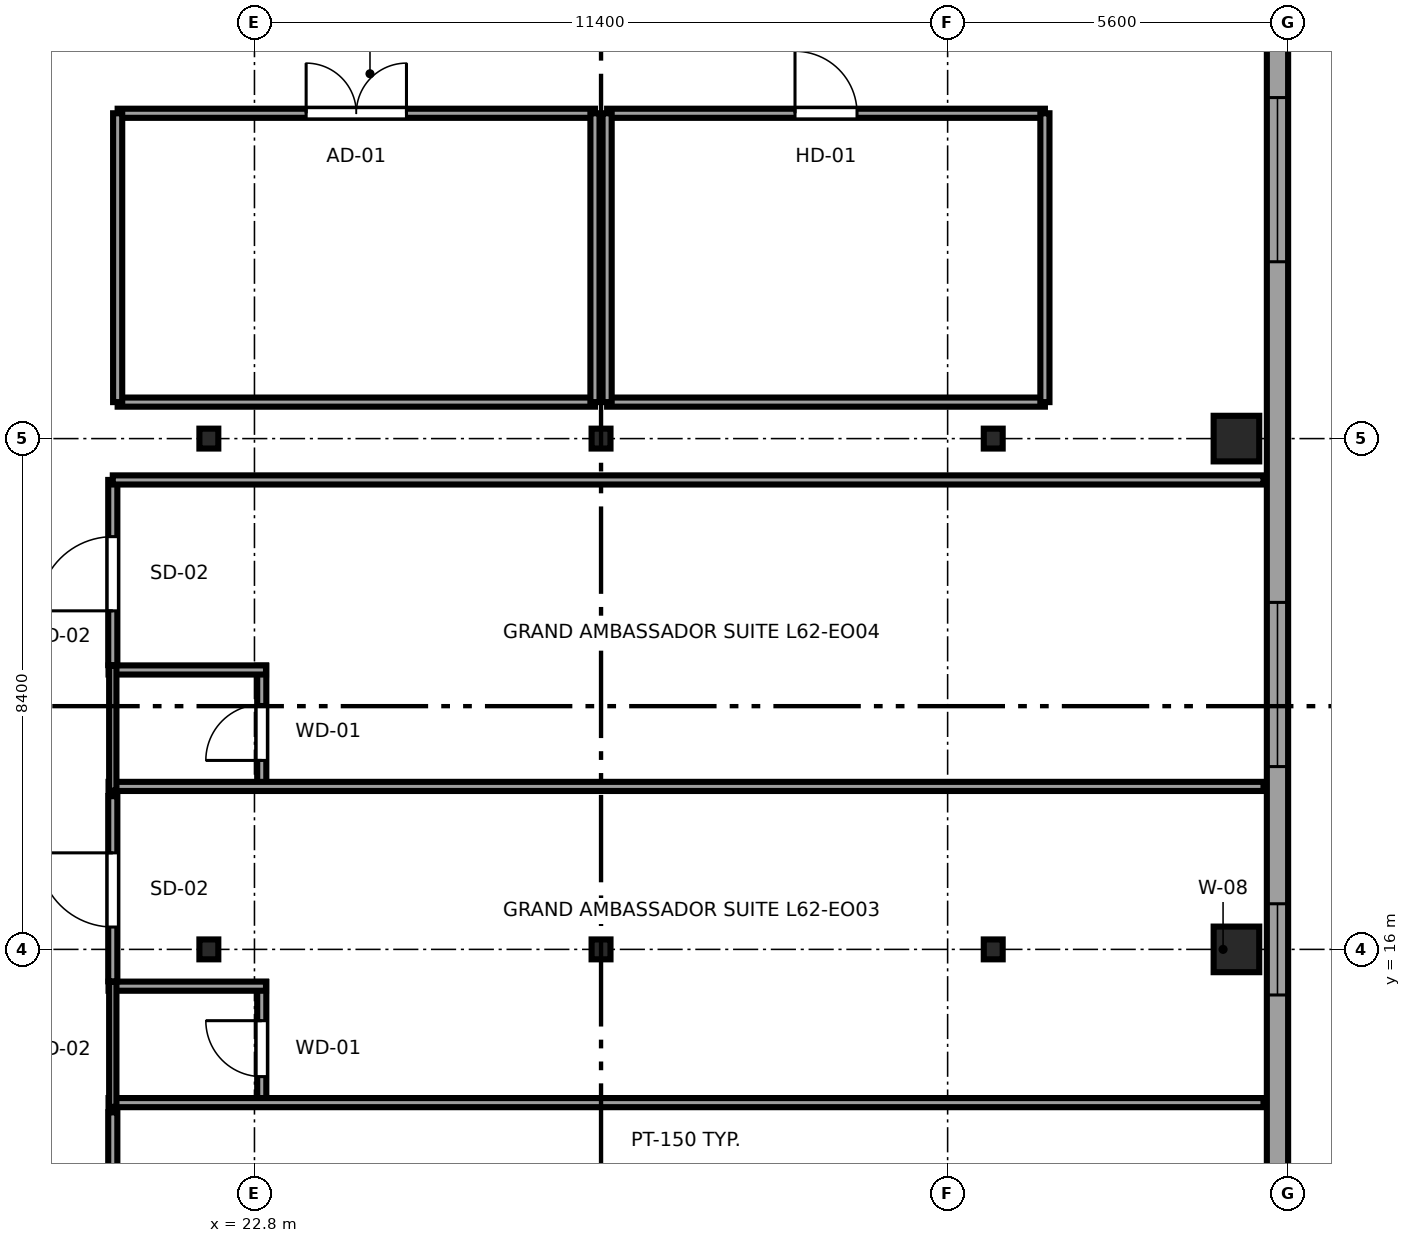
"""IFC4 building model, lengths in metres.
Left out: names, types, materials, properties, quantities, classifications, styles, units other than length and angle.
Written with IfcOpenShell. Run it as: python <this file> out.ifc"""

import sys

from ifc_helpers import new_model, si_unit, direction, frame, frame_2d, origin, origin_2d, place, context, subcontext, project, spatial, rectangle, i_section, extrude, source, transform, mapped, element, fill, save


model = new_model("IFC4")
c1 = context("Model", 3, precision=1e-05, world=origin(), true_north=direction((0.0, 1.0)))
c2 = subcontext(c1, "Body", "Model", "MODEL_VIEW")
j1 = project(units=[si_unit("LENGTHUNIT", "METRE"), si_unit("PLANEANGLEUNIT", "RADIAN")], contexts=[c1])
p1 = place(None, origin())
s1 = spatial("IfcSite", under=j1, at=p1, CompositionType="ELEMENT")
p2 = place(p1, origin())
s2 = spatial("IfcBuilding", under=s1, at=p2, CompositionType="ELEMENT")
p3 = place(p2, frame((0.0, 0.0, 234.55)))
s3 = spatial("IfcBuildingStorey", under=s2, at=p3, CompositionType="ELEMENT", Elevation=234.55)
m1 = source(origin(), c2, "Body", "SweptSolid", [
    extrude(i_section(OverallWidth=0.311, OverallDepth=0.327, WebThickness=0.016, FlangeThickness=0.025, FilletRadius=0.017, at=origin_2d()), origin(), (0.0, 0.0, 1.0), 3.55),
])
for number, where, z_axis, x_axis in (
    (1, (22.05, 16.0, 0.0), (0.0, 0.0, 1.0), (1.0, 0.0, 0.0)),
    (2, (22.05, 24.4, 0.0), (0.0, 0.0, 1.0), (1.0, 0.0, 0.0)),
    (3, (28.5, 16.0, 0.0), (0.0, 0.0, 1.0), (1.0, 0.0, 0.0)),
    (4, (28.5, 24.4, 0.0), (0.0, 0.0, 1.0), (1.0, 0.0, 0.0)),
    (5, (34.95, 16.0, 0.0), (0.0, 0.0, 1.0), (1.0, 0.0, 0.0)),
    (6, (34.95, 24.4, 0.0), (0.0, 0.0, 1.0), (1.0, 0.0, 0.0)),
):
    element("IfcColumn", number, at=place(p3, frame(where, z_axis=z_axis, x_axis=x_axis)), inside=s3, PredefinedType="COLUMN", context=c2, shape_type="MappedRepresentation", body=[
        mapped(m1, transform((0.0, 0.0, 0.0), x_axis=(1.0, 0.0, 0.0), y_axis=(0.0, 1.0, 0.0), z_axis=(0.0, 0.0, 1.0), scale=1.0)),
    ])
m2 = source(origin(), c2, "Body", "SweptSolid", [
    extrude(rectangle(XDim=0.75, YDim=0.75, at=origin_2d()), origin(), (0.0, 0.0, 1.0), 3.55),
])
for number, where, z_axis, x_axis in (
    (7, (38.95, 16.0, 0.0), (0.0, 0.0, 1.0), (1.0, 0.0, 0.0)),
    (8, (38.95, 24.4, 0.0), (0.0, 0.0, 1.0), (1.0, 0.0, 0.0)),
):
    element("IfcColumn", number, at=place(p3, frame(where, z_axis=z_axis, x_axis=x_axis)), inside=s3, PredefinedType="COLUMN", context=c2, shape_type="MappedRepresentation", body=[
        mapped(m2, transform((0.0, 0.0, 0.0), x_axis=(1.0, 0.0, 0.0), y_axis=(0.0, 1.0, 0.0), z_axis=(0.0, 0.0, 1.0), scale=1.0)),
    ])
p4 = place(p3, frame((39.625, 7.017, 0.0), z_axis=(0.0, 0.0, 1.0), x_axis=(0.0, 1.0, 0.0)))
e9 = element("IfcWall", 9, at=p4, inside=s3, PredefinedType="SOLIDWALL", context=c2, shape_type="SweptSolid", body=[
    extrude(rectangle(XDim=24.579, YDim=0.35, at=frame_2d((12.29, 0.0))), origin(), (0.0, 0.0, 1.0), 3.37),
])
p5 = place(p4, frame((2.138, 0.0, 0.68)))
e10 = element("IfcOpeningElement", 10, at=p5, cuts=e9, PredefinedType="OPENING", context=c2, shape_type="SweptSolid", body=[
    extrude(rectangle(XDim=2.7, YDim=1.95, at=frame_2d((1.35, 0.975))), frame((0.0, 0.185, 0.0), z_axis=(0.0, -1.0, 0.0), x_axis=(1.0, 0.0, 0.0)), (0.0, 0.0, 1.0), 0.37),
])
p6 = place(p4, frame((11.989, 0.0, 0.68)))
e11 = element("IfcOpeningElement", 11, at=p6, cuts=e9, PredefinedType="OPENING", context=c2, shape_type="SweptSolid", body=[
    extrude(rectangle(XDim=2.7, YDim=1.95, at=frame_2d((1.35, 0.975))), frame((0.0, 0.185, 0.0), z_axis=(0.0, -1.0, 0.0), x_axis=(1.0, 0.0, 0.0)), (0.0, 0.0, 1.0), 0.37),
])
p7 = place(p4, frame((20.291, 0.0, 0.68)))
e12 = element("IfcOpeningElement", 12, at=p7, cuts=e9, PredefinedType="OPENING", context=c2, shape_type="SweptSolid", body=[
    extrude(rectangle(XDim=2.7, YDim=1.95, at=frame_2d((1.35, 0.975))), frame((0.0, 0.185, 0.0), z_axis=(0.0, -1.0, 0.0), x_axis=(1.0, 0.0, 0.0)), (0.0, 0.0, 1.0), 0.37),
])
p8 = place(p4, frame((8.233, 0.0, 0.62)))
e13 = element("IfcOpeningElement", 13, at=p8, cuts=e9, PredefinedType="OPENING", context=c2, shape_type="SweptSolid", body=[
    extrude(rectangle(XDim=1.5, YDim=1.55, at=frame_2d((0.75, 0.775))), frame((0.0, 0.185, 0.0), z_axis=(0.0, -1.0, 0.0), x_axis=(1.0, 0.0, 0.0)), (0.0, 0.0, 1.0), 0.37),
])
p9 = place(p3, frame((22.92, 13.41, 0.0), z_axis=(0.0, 0.0, 1.0), x_axis=(0.0, 1.0, 0.0)))
e14 = element("IfcWall", 14, at=p9, inside=s3, PredefinedType="PARTITIONING", context=c2, shape_type="SweptSolid", body=[
    extrude(rectangle(XDim=2.055, YDim=0.15, at=frame_2d((1.028, 0.0))), origin(), (0.0, 0.0, 1.0), 3.37),
])
p10 = place(p9, frame((0.498, 0.0, 0.0)))
e15 = element("IfcOpeningElement", 15, at=p10, cuts=e14, PredefinedType="OPENING", context=c2, shape_type="SweptSolid", body=[
    extrude(rectangle(XDim=0.92, YDim=2.01, at=frame_2d((0.46, 1.005))), frame((0.0, 0.085, 0.0), z_axis=(0.0, -1.0, 0.0), x_axis=(1.0, 0.0, 0.0)), (0.0, 0.0, 1.0), 0.17),
])
p11 = place(p3, frame((20.4, 13.48, 0.0), z_axis=(0.0, 0.0, 1.0), x_axis=(1.0, 0.0, 0.0)))
e16 = element("IfcWall", 16, at=p11, inside=s3, PredefinedType="PARTITIONING", context=c2, shape_type="SweptSolid", body=[
    extrude(rectangle(XDim=18.995, YDim=0.15, at=frame_2d((9.498, 0.0))), origin(), (0.0, 0.0, 1.0), 3.37),
])
p12 = place(p3, frame((20.4, 15.395, 0.0), z_axis=(0.0, 0.0, 1.0), x_axis=(1.0, 0.0, 0.0)))
e17 = element("IfcWall", 17, at=p12, inside=s3, PredefinedType="PARTITIONING", context=c2, shape_type="SweptSolid", body=[
    extrude(rectangle(XDim=2.59, YDim=0.15, at=frame_2d((1.295, 0.0))), origin(), (0.0, 0.0, 1.0), 3.37),
])
p13 = place(p3, frame((20.47, 13.41, 0.0), z_axis=(0.0, 0.0, 1.0), x_axis=(0.0, 1.0, 0.0)))
e18 = element("IfcWall", 18, at=p13, inside=s3, PredefinedType="PLUMBINGWALL", context=c2, shape_type="SweptSolid", body=[
    extrude(rectangle(XDim=2.055, YDim=0.12, at=frame_2d((1.028, 0.0))), origin(), (0.0, 0.0, 1.0), 3.37),
])
p14 = place(p3, frame((22.92, 18.61, 0.0), z_axis=(0.0, 0.0, 1.0), x_axis=(0.0, 1.0, 0.0)))
e19 = element("IfcWall", 19, at=p14, inside=s3, PredefinedType="PARTITIONING", context=c2, shape_type="SweptSolid", body=[
    extrude(rectangle(XDim=2.055, YDim=0.15, at=frame_2d((1.027, 0.0))), origin(), (0.0, 0.0, 1.0), 3.37),
])
p15 = place(p14, frame((0.498, 0.0, 0.0)))
e20 = element("IfcOpeningElement", 20, at=p15, cuts=e19, PredefinedType="OPENING", context=c2, shape_type="SweptSolid", body=[
    extrude(rectangle(XDim=0.92, YDim=2.01, at=frame_2d((0.46, 1.005))), frame((0.0, 0.085, 0.0), z_axis=(0.0, -1.0, 0.0), x_axis=(1.0, 0.0, 0.0)), (0.0, 0.0, 1.0), 0.17),
])
p16 = place(p3, frame((20.4, 18.68, 0.0), z_axis=(0.0, 0.0, 1.0), x_axis=(1.0, 0.0, 0.0)))
e21 = element("IfcWall", 21, at=p16, inside=s3, PredefinedType="PARTITIONING", context=c2, shape_type="SweptSolid", body=[
    extrude(rectangle(XDim=18.995, YDim=0.15, at=frame_2d((9.498, 0.0))), origin(), (0.0, 0.0, 1.0), 3.37),
])
p17 = place(p3, frame((20.4, 20.595, 0.0), z_axis=(0.0, 0.0, 1.0), x_axis=(1.0, 0.0, 0.0)))
e22 = element("IfcWall", 22, at=p17, inside=s3, PredefinedType="PARTITIONING", context=c2, shape_type="SweptSolid", body=[
    extrude(rectangle(XDim=2.59, YDim=0.15, at=frame_2d((1.295, 0.0))), origin(), (0.0, 0.0, 1.0), 3.37),
])
p18 = place(p3, frame((20.47, 18.61, 0.0), z_axis=(0.0, 0.0, 1.0), x_axis=(0.0, 1.0, 0.0)))
e23 = element("IfcWall", 23, at=p18, inside=s3, PredefinedType="PLUMBINGWALL", context=c2, shape_type="SweptSolid", body=[
    extrude(rectangle(XDim=2.055, YDim=0.12, at=frame_2d((1.027, 0.0))), origin(), (0.0, 0.0, 1.0), 3.37),
])
p19 = place(p3, frame((20.47, 10.275, 0.0), z_axis=(0.0, 0.0, 1.0), x_axis=(0.0, 1.0, 0.0)))
e24 = element("IfcWall", 24, at=p19, inside=s3, PredefinedType="PARTITIONING", context=c2, shape_type="SweptSolid", body=[
    extrude(rectangle(XDim=3.045, YDim=0.15, at=frame_2d((1.522, 0.0))), origin(), (0.0, 0.0, 1.0), 3.37),
])
p20 = place(p19, frame((0.893, 0.0, 0.0)))
e25 = element("IfcOpeningElement", 25, at=p20, cuts=e24, PredefinedType="OPENING", context=c2, shape_type="SweptSolid", body=[
    extrude(rectangle(XDim=1.22, YDim=2.08, at=frame_2d((0.61, 1.04))), frame((0.0, 0.085, 0.0), z_axis=(0.0, -1.0, 0.0), x_axis=(1.0, 0.0, 0.0)), (0.0, 0.0, 1.0), 0.17),
])
p21 = place(p3, frame((20.47, 15.475, 0.0), z_axis=(0.0, 0.0, 1.0), x_axis=(0.0, 1.0, 0.0)))
e26 = element("IfcWall", 26, at=p21, inside=s3, PredefinedType="PARTITIONING", context=c2, shape_type="SweptSolid", body=[
    extrude(rectangle(XDim=3.045, YDim=0.15, at=frame_2d((1.522, 0.0))), origin(), (0.0, 0.0, 1.0), 3.37),
])
p22 = place(p21, frame((0.893, 0.0, 0.0)))
e27 = element("IfcOpeningElement", 27, at=p22, cuts=e26, PredefinedType="OPENING", context=c2, shape_type="SweptSolid", body=[
    extrude(rectangle(XDim=1.22, YDim=2.08, at=frame_2d((0.61, 1.04))), frame((0.0, 0.085, 0.0), z_axis=(0.0, -1.0, 0.0), x_axis=(1.0, 0.0, 0.0)), (0.0, 0.0, 1.0), 0.17),
])
p23 = place(p3, frame((20.47, 20.675, 0.0), z_axis=(0.0, 0.0, 1.0), x_axis=(0.0, 1.0, 0.0)))
e28 = element("IfcWall", 28, at=p23, inside=s3, PredefinedType="PARTITIONING", context=c2, shape_type="SweptSolid", body=[
    extrude(rectangle(XDim=3.045, YDim=0.15, at=frame_2d((1.522, 0.0))), origin(), (0.0, 0.0, 1.0), 3.37),
])
p24 = place(p23, frame((0.893, 0.0, 0.0)))
e29 = element("IfcOpeningElement", 29, at=p24, cuts=e28, PredefinedType="OPENING", context=c2, shape_type="SweptSolid", body=[
    extrude(rectangle(XDim=1.22, YDim=2.08, at=frame_2d((0.61, 1.04))), frame((0.0, 0.085, 0.0), z_axis=(0.0, -1.0, 0.0), x_axis=(1.0, 0.0, 0.0)), (0.0, 0.0, 1.0), 0.17),
])
p25 = place(p3, frame((20.47, 23.72, 0.0), z_axis=(0.0, 0.0, 1.0), x_axis=(1.0, 0.0, 0.0)))
e30 = element("IfcWall", 30, at=p25, inside=s3, PredefinedType="PARTITIONING", context=c2, shape_type="SweptSolid", body=[
    extrude(rectangle(XDim=18.925, YDim=0.15, at=frame_2d((9.462, 0.0))), origin(), (0.0, 0.0, 1.0), 3.37),
])
p26 = place(p3, frame((20.55, 25.0, 0.0), z_axis=(0.0, 0.0, 1.0), x_axis=(1.0, 0.0, 0.0)))
e31 = element("IfcWall", 31, at=p26, inside=s3, PredefinedType="PARTITIONING", context=c2, shape_type="SweptSolid", body=[
    extrude(rectangle(XDim=7.85, YDim=0.15, at=frame_2d((3.925, 0.0))), origin(), (0.0, 0.0, 1.0), 3.37),
])
p27 = place(p3, frame((20.55, 29.75, 0.0), z_axis=(0.0, 0.0, 1.0), x_axis=(1.0, 0.0, 0.0)))
e32 = element("IfcWall", 32, at=p27, inside=s3, PredefinedType="PARTITIONING", context=c2, shape_type="SweptSolid", body=[
    extrude(rectangle(XDim=7.85, YDim=0.15, at=frame_2d((3.925, 0.0))), origin(), (0.0, 0.0, 1.0), 3.37),
])
p28 = place(p27, frame((3.1, 0.0, 0.0)))
e33 = element("IfcOpeningElement", 33, at=p28, cuts=e32, PredefinedType="OPENING", context=c2, shape_type="SweptSolid", body=[
    extrude(rectangle(XDim=1.65, YDim=2.15, at=frame_2d((0.825, 1.075))), frame((0.0, 0.085, 0.0), z_axis=(0.0, -1.0, 0.0), x_axis=(1.0, 0.0, 0.0)), (0.0, 0.0, 1.0), 0.17),
])
p29 = place(p3, frame((20.55, 25.0, 0.0), z_axis=(0.0, 0.0, 1.0), x_axis=(0.0, 1.0, 0.0)))
e34 = element("IfcWall", 34, at=p29, inside=s3, PredefinedType="PARTITIONING", context=c2, shape_type="SweptSolid", body=[
    extrude(rectangle(XDim=4.75, YDim=0.15, at=frame_2d((2.375, 0.0))), origin(), (0.0, 0.0, 1.0), 3.37),
])
p30 = place(p3, frame((28.4, 25.0, 0.0), z_axis=(0.0, 0.0, 1.0), x_axis=(0.0, 1.0, 0.0)))
e35 = element("IfcWall", 35, at=p30, inside=s3, PredefinedType="PARTITIONING", context=c2, shape_type="SweptSolid", body=[
    extrude(rectangle(XDim=4.75, YDim=0.15, at=frame_2d((2.375, 0.0))), origin(), (0.0, 0.0, 1.0), 2.758),
])
p31 = place(p3, frame((28.6, 25.0, 0.0), z_axis=(0.0, 0.0, 1.0), x_axis=(1.0, 0.0, 0.0)))
e36 = element("IfcWall", 36, at=p31, inside=s3, PredefinedType="PARTITIONING", context=c2, shape_type="SweptSolid", body=[
    extrude(rectangle(XDim=7.2, YDim=0.15, at=frame_2d((3.6, 0.0))), origin(), (0.0, 0.0, 1.0), 3.37),
])
p32 = place(p3, frame((28.6, 29.75, 0.0), z_axis=(0.0, 0.0, 1.0), x_axis=(1.0, 0.0, 0.0)))
e37 = element("IfcWall", 37, at=p32, inside=s3, PredefinedType="PARTITIONING", context=c2, shape_type="SweptSolid", body=[
    extrude(rectangle(XDim=7.2, YDim=0.15, at=frame_2d((3.6, 0.0))), origin(), (0.0, 0.0, 1.0), 3.37),
])
p33 = place(p32, frame((3.09, 0.0, 0.0)))
e38 = element("IfcOpeningElement", 38, at=p33, cuts=e37, PredefinedType="OPENING", context=c2, shape_type="SweptSolid", body=[
    extrude(rectangle(XDim=1.02, YDim=2.03, at=frame_2d((0.51, 1.015))), frame((0.0, 0.085, 0.0), z_axis=(0.0, -1.0, 0.0), x_axis=(1.0, 0.0, 0.0)), (0.0, 0.0, 1.0), 0.17),
])
p34 = place(p3, frame((28.6, 25.0, 0.0), z_axis=(0.0, 0.0, 1.0), x_axis=(0.0, 1.0, 0.0)))
e39 = element("IfcWall", 39, at=p34, inside=s3, PredefinedType="PARTITIONING", context=c2, shape_type="SweptSolid", body=[
    extrude(rectangle(XDim=4.75, YDim=0.15, at=frame_2d((2.375, 0.0))), origin(), (0.0, 0.0, 1.0), 2.758),
])
p35 = place(p3, frame((35.8, 25.0, 0.0), z_axis=(0.0, 0.0, 1.0), x_axis=(0.0, 1.0, 0.0)))
e40 = element("IfcWall", 40, at=p35, inside=s3, PredefinedType="PARTITIONING", context=c2, shape_type="SweptSolid", body=[
    extrude(rectangle(XDim=4.75, YDim=0.15, at=frame_2d((2.375, 0.0))), origin(), (0.0, 0.0, 1.0), 3.37),
])
m3 = source(origin(), c2, "Body", "SweptSolid", [
    extrude(rectangle(XDim=2.7, YDim=1.95, at=frame_2d((1.35, 0.975))), frame((0.0, 0.09, 0.0), z_axis=(0.0, -1.0, 0.0), x_axis=(1.0, 0.0, 0.0)), (0.0, 0.0, 1.0), 0.06),
])
p36 = place(p6, origin())
e41 = element("IfcWindow", 41, at=p36, inside=s3, PartitioningType="TRIPLE_PANEL_HORIZONTAL", PredefinedType="WINDOW", context=c2, shape_type="MappedRepresentation", body=[
    mapped(m3, transform((0.0, 0.0, 0.0), x_axis=(1.0, 0.0, 0.0), y_axis=(0.0, 1.0, 0.0), z_axis=(0.0, 0.0, 1.0), scale=1.0)),
])
fill(e11, e41)
p37 = place(p7, origin())
e42 = element("IfcWindow", 42, at=p37, inside=s3, PartitioningType="TRIPLE_PANEL_HORIZONTAL", PredefinedType="WINDOW", context=c2, shape_type="MappedRepresentation", body=[
    mapped(m3, transform((0.0, 0.0, 0.0), x_axis=(1.0, 0.0, 0.0), y_axis=(0.0, 1.0, 0.0), z_axis=(0.0, 0.0, 1.0), scale=1.0)),
])
fill(e12, e42)
m4 = source(origin(), c2, "Body", "SweptSolid", [
    extrude(rectangle(XDim=1.5, YDim=1.55, at=frame_2d((0.75, 0.775))), frame((0.0, 0.09, 0.0), z_axis=(0.0, -1.0, 0.0), x_axis=(1.0, 0.0, 0.0)), (0.0, 0.0, 1.0), 0.06),
])
p38 = place(p8, origin())
e43 = element("IfcWindow", 43, at=p38, inside=s3, PartitioningType="SINGLE_PANEL", PredefinedType="WINDOW", context=c2, shape_type="MappedRepresentation", body=[
    mapped(m4, transform((0.0, 0.0, 0.0), x_axis=(1.0, 0.0, 0.0), y_axis=(0.0, 1.0, 0.0), z_axis=(0.0, 0.0, 1.0), scale=1.0)),
])
fill(e13, e43)
m5 = source(origin(), c2, "Body", "SweptSolid", [
    extrude(rectangle(XDim=0.92, YDim=2.01, at=frame_2d((0.46, 1.005))), frame((0.0, 0.025, 0.0), z_axis=(0.0, -1.0, 0.0), x_axis=(1.0, 0.0, 0.0)), (0.0, 0.0, 1.0), 0.05),
])
p39 = place(p10, origin())
e44 = element("IfcDoor", 44, at=p39, inside=s3, OperationType="SINGLE_SWING_RIGHT", PredefinedType="DOOR", context=c2, shape_type="MappedRepresentation", body=[
    mapped(m5, transform((0.0, 0.0, 0.0), x_axis=(1.0, 0.0, 0.0), y_axis=(0.0, 1.0, 0.0), z_axis=(0.0, 0.0, 1.0), scale=1.0)),
])
fill(e15, e44)
p40 = place(p15, origin())
e45 = element("IfcDoor", 45, at=p40, inside=s3, OperationType="SINGLE_SWING_LEFT", PredefinedType="DOOR", context=c2, shape_type="MappedRepresentation", body=[
    mapped(m5, transform((0.0, 0.0, 0.0), x_axis=(1.0, 0.0, 0.0), y_axis=(0.0, 1.0, 0.0), z_axis=(0.0, 0.0, 1.0), scale=1.0)),
])
fill(e20, e45)
m6 = source(origin(), c2, "Body", "SweptSolid", [
    extrude(rectangle(XDim=1.22, YDim=2.08, at=frame_2d((0.61, 1.04))), frame((0.0, 0.025, 0.0), z_axis=(0.0, -1.0, 0.0), x_axis=(1.0, 0.0, 0.0)), (0.0, 0.0, 1.0), 0.05),
])
p41 = place(p22, origin())
e46 = element("IfcDoor", 46, at=p41, inside=s3, OperationType="SINGLE_SWING_RIGHT", PredefinedType="DOOR", context=c2, shape_type="MappedRepresentation", body=[
    mapped(m6, transform((0.0, 0.0, 0.0), x_axis=(1.0, 0.0, 0.0), y_axis=(0.0, 1.0, 0.0), z_axis=(0.0, 0.0, 1.0), scale=1.0)),
])
fill(e27, e46)
p42 = place(p24, origin())
e47 = element("IfcDoor", 47, at=p42, inside=s3, OperationType="SINGLE_SWING_LEFT", PredefinedType="DOOR", context=c2, shape_type="MappedRepresentation", body=[
    mapped(m6, transform((0.0, 0.0, 0.0), x_axis=(1.0, 0.0, 0.0), y_axis=(0.0, 1.0, 0.0), z_axis=(0.0, 0.0, 1.0), scale=1.0)),
])
fill(e29, e47)
m7 = source(origin(), c2, "Body", "SweptSolid", [
    extrude(rectangle(XDim=1.65, YDim=2.15, at=frame_2d((0.825, 1.075))), frame((0.0, 0.025, 0.0), z_axis=(0.0, -1.0, 0.0), x_axis=(1.0, 0.0, 0.0)), (0.0, 0.0, 1.0), 0.05),
])
p43 = place(p28, origin())
e48 = element("IfcDoor", 48, at=p43, inside=s3, OperationType="DOUBLE_DOOR_SINGLE_SWING", PredefinedType="DOOR", context=c2, shape_type="MappedRepresentation", body=[
    mapped(m7, transform((0.0, 0.0, 0.0), x_axis=(1.0, 0.0, 0.0), y_axis=(0.0, 1.0, 0.0), z_axis=(0.0, 0.0, 1.0), scale=1.0)),
])
fill(e33, e48)
m8 = source(origin(), c2, "Body", "SweptSolid", [
    extrude(rectangle(XDim=1.02, YDim=2.03, at=frame_2d((0.51, 1.015))), frame((0.0, 0.025, 0.0), z_axis=(0.0, -1.0, 0.0), x_axis=(1.0, 0.0, 0.0)), (0.0, 0.0, 1.0), 0.05),
])
p44 = place(p33, origin())
e49 = element("IfcDoor", 49, at=p44, inside=s3, OperationType="SINGLE_SWING_LEFT", PredefinedType="DOOR", context=c2, shape_type="MappedRepresentation", body=[
    mapped(m8, transform((0.0, 0.0, 0.0), x_axis=(1.0, 0.0, 0.0), y_axis=(0.0, 1.0, 0.0), z_axis=(0.0, 0.0, 1.0), scale=1.0)),
])
fill(e38, e49)
save(model, sys.argv[1])
